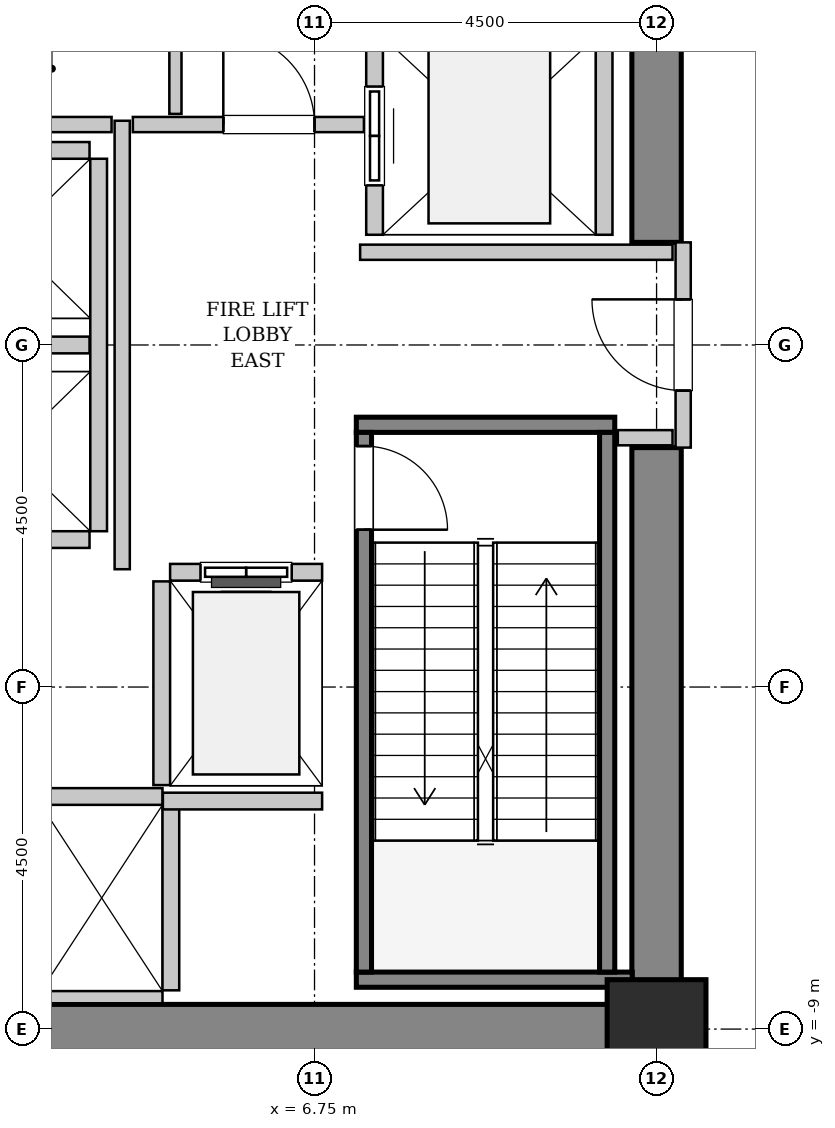
"""IFC4 building model, lengths in metres.
Left out: names, types, materials, properties, quantities, classifications, styles, units other than length and angle.
Written with IfcOpenShell. Run it as: python <this file> out.ifc"""

import sys

from ifc_helpers import new_model, si_unit, direction, frame, frame_2d, origin, origin_2d, place, context, subcontext, project, spatial, rectangle, hollow_rectangle, extrude, source, transform, mapped, element, fill, save


model = new_model("IFC4")
c1 = context("Model", 3, precision=1e-05, world=origin(), true_north=direction((0.0, 1.0)))
c2 = subcontext(c1, "Body", "Model", "MODEL_VIEW")
j1 = project(units=[si_unit("LENGTHUNIT", "METRE"), si_unit("PLANEANGLEUNIT", "RADIAN")], contexts=[c1])
p1 = place(None, origin())
s1 = spatial("IfcSite", under=j1, at=p1, CompositionType="ELEMENT")
p2 = place(p1, origin())
s2 = spatial("IfcBuilding", under=s1, at=p2, CompositionType="ELEMENT")
p3 = place(p2, frame((0.0, 0.0, 16.8)))
s3 = spatial("IfcBuildingStorey", under=s2, at=p3, CompositionType="ELEMENT", Elevation=16.8)
m1 = source(origin(), c2, "Body", "SweptSolid", [
    extrude(rectangle(XDim=10.025, YDim=0.65, at=frame_2d((5.012, 0.0))), origin(), (0.0, 0.0, 1.0), 5.4),
])
p4 = place(p3, frame((1.55, -9.0, 0.0), z_axis=(0.0, 0.0, 1.0), x_axis=(1.0, 0.0, 0.0)))
e1 = element("IfcWall", 1, at=p4, inside=s3, PredefinedType="SHEAR", context=c2, shape_type="MappedRepresentation", body=[
    mapped(m1, transform((0.0, 0.0, 0.0), x_axis=(1.0, 0.0, 0.0), y_axis=(0.0, 1.0, 0.0), z_axis=(0.0, 0.0, 1.0), scale=1.0)),
])
m2 = source(origin(), c2, "Body", "SweptSolid", [
    extrude(rectangle(XDim=7.325, YDim=0.65, at=frame_2d((3.663, 0.0))), origin(), (0.0, 0.0, 1.0), 5.4),
])
for number, where, z_axis, x_axis in (
    (2, (11.25, -8.675, 0.0), (0.0, 0.0, 1.0), (0.0, 1.0, 0.0)),
    (3, (11.25, 1.35, 0.0), (0.0, 0.0, 1.0), (0.0, 1.0, 0.0)),
):
    element("IfcWall", number, at=place(p3, frame(where, z_axis=z_axis, x_axis=x_axis)), inside=s3, PredefinedType="SHEAR", context=c2, shape_type="MappedRepresentation", body=[
        mapped(m2, transform((0.0, 0.0, 0.0), x_axis=(1.0, 0.0, 0.0), y_axis=(0.0, 1.0, 0.0), z_axis=(0.0, 0.0, 1.0), scale=1.0)),
    ])
m3 = source(origin(), c2, "Body", "SweptSolid", [
    extrude(hollow_rectangle(XDim=1.3, YDim=1.3, WallThickness=0.065, InnerFilletRadius=0.065, OuterFilletRadius=0.13, at=origin_2d()), origin(), (0.0, 0.0, 1.0), 5.4),
])
p5 = place(p3, frame((11.25, -9.0, 0.0), z_axis=(0.0, 0.0, 1.0), x_axis=(1.0, 0.0, 0.0)))
e4 = element("IfcColumn", 4, at=p5, inside=s3, PredefinedType="COLUMN", context=c2, shape_type="MappedRepresentation", body=[
    mapped(m3, transform((0.0, 0.0, 0.0), x_axis=(1.0, 0.0, 0.0), y_axis=(0.0, 1.0, 0.0), z_axis=(0.0, 0.0, 1.0), scale=1.0)),
])
m4 = source(origin(), c2, "Body", "SweptSolid", [
    extrude(rectangle(XDim=3.4, YDim=0.2, at=frame_2d((1.7, 0.0))), origin(), (0.0, 0.0, 1.0), 5.4),
])
p6 = place(p3, frame((7.3, -1.05, 0.0), z_axis=(0.0, 0.0, 1.0), x_axis=(1.0, 0.0, 0.0)))
e5 = element("IfcWall", 5, at=p6, inside=s3, PredefinedType="SOLIDWALL", context=c2, shape_type="MappedRepresentation", body=[
    mapped(m4, transform((0.0, 0.0, 0.0), x_axis=(1.0, 0.0, 0.0), y_axis=(0.0, 1.0, 0.0), z_axis=(0.0, 0.0, 1.0), scale=1.0)),
])
m5 = source(origin(), c2, "Body", "SweptSolid", [
    extrude(rectangle(XDim=3.63, YDim=0.2, at=frame_2d((1.815, 0.0))), origin(), (0.0, 0.0, 1.0), 5.4),
])
p7 = place(p3, frame((7.3, -8.35, 0.0), z_axis=(0.0, 0.0, 1.0), x_axis=(1.0, 0.0, 0.0)))
e6 = element("IfcWall", 6, at=p7, inside=s3, PredefinedType="SOLIDWALL", context=c2, shape_type="MappedRepresentation", body=[
    mapped(m5, transform((0.0, 0.0, 0.0), x_axis=(1.0, 0.0, 0.0), y_axis=(0.0, 1.0, 0.0), z_axis=(0.0, 0.0, 1.0), scale=1.0)),
])
m6 = source(origin(), c2, "Body", "SweptSolid", [
    extrude(rectangle(XDim=7.1, YDim=0.2, at=frame_2d((3.55, 0.0))), origin(), (0.0, 0.0, 1.0), 5.4),
])
p8 = place(p3, frame((7.4, -1.15, 0.0), z_axis=(0.0, 0.0, 1.0), x_axis=(0.0, -1.0, 0.0)))
e7 = element("IfcWall", 7, at=p8, inside=s3, PredefinedType="SOLIDWALL", context=c2, shape_type="MappedRepresentation", body=[
    mapped(m6, transform((0.0, 0.0, 0.0), x_axis=(1.0, 0.0, 0.0), y_axis=(0.0, 1.0, 0.0), z_axis=(0.0, 0.0, 1.0), scale=1.0)),
])
p9 = place(p8, frame((0.18, 0.0, 0.0)))
e8 = element("IfcOpeningElement", 8, at=p9, cuts=e7, PredefinedType="OPENING", context=c2, shape_type="SweptSolid", body=[
    extrude(rectangle(XDim=1.1, YDim=2.15, at=frame_2d((0.55, 1.075))), frame((0.0, 0.11, 0.0), z_axis=(0.0, -1.0, 0.0), x_axis=(1.0, 0.0, 0.0)), (0.0, 0.0, 1.0), 0.22),
])
p10 = place(p3, frame((10.6, -1.15, 0.0), z_axis=(0.0, 0.0, 1.0), x_axis=(0.0, -1.0, 0.0)))
e9 = element("IfcWall", 9, at=p10, inside=s3, PredefinedType="SOLIDWALL", context=c2, shape_type="MappedRepresentation", body=[
    mapped(m6, transform((0.0, 0.0, 0.0), x_axis=(1.0, 0.0, 0.0), y_axis=(0.0, 1.0, 0.0), z_axis=(0.0, 0.0, 1.0), scale=1.0)),
])
m7 = source(origin(), c2, "Body", "SweptSolid", [
    extrude(rectangle(XDim=2.0, YDim=0.22, at=frame_2d((1.0, 0.0))), origin(), (0.0, 0.0, 1.0), 5.085),
])
p11 = place(p3, frame((6.85, -2.99, 0.0), z_axis=(0.0, 0.0, 1.0), x_axis=(-1.0, 0.0, 0.0)))
e10 = element("IfcWall", 10, at=p11, inside=s3, PredefinedType="SOLIDWALL", context=c2, shape_type="MappedRepresentation", body=[
    mapped(m7, transform((0.0, 0.0, 0.0), x_axis=(1.0, 0.0, 0.0), y_axis=(0.0, 1.0, 0.0), z_axis=(0.0, 0.0, 1.0), scale=1.0)),
])
p12 = place(p11, frame((0.4, 0.0, 0.0)))
e11 = element("IfcOpeningElement", 11, at=p12, cuts=e10, PredefinedType="OPENING", context=c2, shape_type="SweptSolid", body=[
    extrude(rectangle(XDim=1.2, YDim=2.2, at=frame_2d((0.6, 1.1))), frame((0.0, 0.12, 0.0), z_axis=(0.0, -1.0, 0.0), x_axis=(1.0, 0.0, 0.0)), (0.0, 0.0, 1.0), 0.24),
])
m8 = source(origin(), c2, "Body", "SweptSolid", [
    extrude(rectangle(XDim=2.68, YDim=0.22, at=frame_2d((1.34, 0.0))), origin(), (0.0, 0.0, 1.0), 5.085),
])
p13 = place(p3, frame((4.74, -3.11, 0.0), z_axis=(0.0, 0.0, 1.0), x_axis=(0.0, -1.0, 0.0)))
e12 = element("IfcWall", 12, at=p13, inside=s3, PredefinedType="SOLIDWALL", context=c2, shape_type="MappedRepresentation", body=[
    mapped(m8, transform((0.0, 0.0, 0.0), x_axis=(1.0, 0.0, 0.0), y_axis=(0.0, 1.0, 0.0), z_axis=(0.0, 0.0, 1.0), scale=1.0)),
])
m9 = source(origin(), c2, "Body", "SweptSolid", [
    extrude(rectangle(XDim=5.45, YDim=0.22, at=frame_2d((2.725, 0.0))), origin(), (0.0, 0.0, 1.0), 5.085),
])
p14 = place(p3, frame((7.54, 6.9, 0.0), z_axis=(0.0, 0.0, 1.0), x_axis=(0.0, -1.0, 0.0)))
e13 = element("IfcWall", 13, at=p14, inside=s3, PredefinedType="SOLIDWALL", context=c2, shape_type="MappedRepresentation", body=[
    mapped(m9, transform((0.0, 0.0, 0.0), x_axis=(1.0, 0.0, 0.0), y_axis=(0.0, 1.0, 0.0), z_axis=(0.0, 0.0, 1.0), scale=1.0)),
])
p15 = place(p14, frame((3.5, 0.0, 0.0)))
e14 = element("IfcOpeningElement", 14, at=p15, cuts=e13, PredefinedType="OPENING", context=c2, shape_type="SweptSolid", body=[
    extrude(rectangle(XDim=1.3, YDim=2.3, at=frame_2d((0.65, 1.15))), frame((0.0, 0.12, 0.0), z_axis=(0.0, -1.0, 0.0), x_axis=(1.0, 0.0, 0.0)), (0.0, 0.0, 1.0), 0.24),
])
p16 = place(p14, frame((0.65, 0.0, 0.0)))
e15 = element("IfcOpeningElement", 15, at=p16, cuts=e13, PredefinedType="OPENING", context=c2, shape_type="SweptSolid", body=[
    extrude(rectangle(XDim=1.3, YDim=2.3, at=frame_2d((0.65, 1.15))), frame((0.0, 0.12, 0.0), z_axis=(0.0, -1.0, 0.0), x_axis=(1.0, 0.0, 0.0)), (0.0, 0.0, 1.0), 0.24),
])
p17 = place(p3, frame((10.56, 1.45, 0.0), z_axis=(0.0, 0.0, 1.0), x_axis=(0.0, 1.0, 0.0)))
e16 = element("IfcWall", 16, at=p17, inside=s3, PredefinedType="SOLIDWALL", context=c2, shape_type="MappedRepresentation", body=[
    mapped(m9, transform((0.0, 0.0, 0.0), x_axis=(1.0, 0.0, 0.0), y_axis=(0.0, 1.0, 0.0), z_axis=(0.0, 0.0, 1.0), scale=1.0)),
])
m10 = source(origin(), c2, "Body", "SweptSolid", [
    extrude(rectangle(XDim=3.2, YDim=0.22, at=frame_2d((1.6, 0.0))), origin(), (0.0, 0.0, 1.0), 5.085),
])
p18 = place(p3, frame((4.75, -5.94, 0.0), z_axis=(0.0, 0.0, 1.0), x_axis=(-1.0, 0.0, 0.0)))
e17 = element("IfcWall", 17, at=p18, inside=s3, PredefinedType="SOLIDWALL", context=c2, shape_type="MappedRepresentation", body=[
    mapped(m10, transform((0.0, 0.0, 0.0), x_axis=(1.0, 0.0, 0.0), y_axis=(0.0, 1.0, 0.0), z_axis=(0.0, 0.0, 1.0), scale=1.0)),
])
m11 = source(origin(), c2, "Body", "SweptSolid", [
    extrude(rectangle(XDim=3.2, YDim=0.16, at=frame_2d((1.6, 0.0))), origin(), (0.0, 0.0, 1.0), 3.975),
])
p19 = place(p3, frame((1.55, -8.58, 0.0), z_axis=(0.0, 0.0, 1.0), x_axis=(1.0, 0.0, 0.0)))
e18 = element("IfcWall", 18, at=p19, inside=s3, PredefinedType="PARTITIONING", context=c2, shape_type="MappedRepresentation", body=[
    mapped(m11, transform((0.0, 0.0, 0.0), x_axis=(1.0, 0.0, 0.0), y_axis=(0.0, 1.0, 0.0), z_axis=(0.0, 0.0, 1.0), scale=1.0)),
])
m12 = source(origin(), c2, "Body", "SweptSolid", [
    extrude(rectangle(XDim=2.43, YDim=0.22, at=frame_2d((1.215, 0.0))), origin(), (0.0, 0.0, 1.0), 5.085),
])
p20 = place(p3, frame((4.86, -8.49, 0.0), z_axis=(0.0, 0.0, 1.0), x_axis=(0.0, 1.0, 0.0)))
e19 = element("IfcWall", 19, at=p20, inside=s3, PredefinedType="SOLIDWALL", context=c2, shape_type="MappedRepresentation", body=[
    mapped(m12, transform((0.0, 0.0, 0.0), x_axis=(1.0, 0.0, 0.0), y_axis=(0.0, 1.0, 0.0), z_axis=(0.0, 0.0, 1.0), scale=1.0)),
])
m13 = source(origin(), c2, "Body", "SweptSolid", [
    extrude(rectangle(XDim=4.9, YDim=0.22, at=frame_2d((2.45, 0.0))), origin(), (0.0, 0.0, 1.0), 5.085),
])
p21 = place(p3, frame((3.91, -2.45, 0.0), z_axis=(0.0, 0.0, 1.0), x_axis=(0.0, 1.0, 0.0)))
e20 = element("IfcWall", 20, at=p21, inside=s3, PredefinedType="SOLIDWALL", context=c2, shape_type="MappedRepresentation", body=[
    mapped(m13, transform((0.0, 0.0, 0.0), x_axis=(1.0, 0.0, 0.0), y_axis=(0.0, 1.0, 0.0), z_axis=(0.0, 0.0, 1.0), scale=1.0)),
])
m14 = source(origin(), c2, "Body", "SweptSolid", [
    extrude(rectangle(XDim=2.13, YDim=0.22, at=frame_2d((1.065, 0.0))), origin(), (0.0, 0.0, 1.0), 5.085),
])
for number, where, z_axis, x_axis in (
    (21, (1.66, -2.56, 0.0), (0.0, 0.0, 1.0), (1.0, 0.0, 0.0)),
    (22, (1.66, 0.0, 0.0), (0.0, 0.0, 1.0), (1.0, 0.0, 0.0)),
    (23, (3.79, 2.56, 0.0), (0.0, 0.0, 1.0), (-1.0, 0.0, 0.0)),
):
    element("IfcWall", number, at=place(p3, frame(where, z_axis=z_axis, x_axis=x_axis)), inside=s3, PredefinedType="SOLIDWALL", context=c2, shape_type="MappedRepresentation", body=[
        mapped(m14, transform((0.0, 0.0, 0.0), x_axis=(1.0, 0.0, 0.0), y_axis=(0.0, 1.0, 0.0), z_axis=(0.0, 0.0, 1.0), scale=1.0)),
    ])
m15 = source(origin(), c2, "Body", "SweptSolid", [
    extrude(rectangle(XDim=2.095, YDim=0.22, at=frame_2d((1.048, 0.0))), origin(), (0.0, 0.0, 1.0), 5.085),
])
p22 = place(p3, frame((4.755, -6.0, 0.0), z_axis=(0.0, 0.0, 1.0), x_axis=(1.0, 0.0, 0.0)))
e24 = element("IfcWall", 24, at=p22, inside=s3, PredefinedType="SOLIDWALL", context=c2, shape_type="MappedRepresentation", body=[
    mapped(m15, transform((0.0, 0.0, 0.0), x_axis=(1.0, 0.0, 0.0), y_axis=(0.0, 1.0, 0.0), z_axis=(0.0, 0.0, 1.0), scale=1.0)),
])
m16 = source(origin(), c2, "Body", "SweptSolid", [
    extrude(rectangle(XDim=2.7, YDim=0.2, at=frame_2d((1.35, 0.0))), origin(), (0.0, 0.0, 1.0), 3.975),
])
p23 = place(p3, frame((11.6, -1.35, 0.0), z_axis=(0.0, 0.0, 1.0), x_axis=(0.0, 1.0, 0.0)))
e25 = element("IfcWall", 25, at=p23, inside=s3, PredefinedType="PARTITIONING", context=c2, shape_type="MappedRepresentation", body=[
    mapped(m16, transform((0.0, 0.0, 0.0), x_axis=(1.0, 0.0, 0.0), y_axis=(0.0, 1.0, 0.0), z_axis=(0.0, 0.0, 1.0), scale=1.0)),
])
p24 = place(p23, frame((0.75, 0.0, 0.0)))
e26 = element("IfcOpeningElement", 26, at=p24, cuts=e25, PredefinedType="OPENING", context=c2, shape_type="SweptSolid", body=[
    extrude(rectangle(XDim=1.2, YDim=2.15, at=frame_2d((0.6, 1.075))), frame((0.0, 0.11, 0.0), z_axis=(0.0, -1.0, 0.0), x_axis=(1.0, 0.0, 0.0)), (0.0, 0.0, 1.0), 0.22),
])
m17 = source(origin(), c2, "Body", "SweptSolid", [
    extrude(rectangle(XDim=5.9, YDim=0.2, at=frame_2d((2.95, 0.0))), origin(), (0.0, 0.0, 1.0), 5.085),
])
p25 = place(p3, frame((4.22, -2.95, 0.0), z_axis=(0.0, 0.0, 1.0), x_axis=(0.0, 1.0, 0.0)))
e27 = element("IfcWall", 27, at=p25, inside=s3, PredefinedType="PARTITIONING", context=c2, shape_type="MappedRepresentation", body=[
    mapped(m17, transform((0.0, 0.0, 0.0), x_axis=(1.0, 0.0, 0.0), y_axis=(0.0, 1.0, 0.0), z_axis=(0.0, 0.0, 1.0), scale=1.0)),
])
m18 = source(origin(), c2, "Body", "SweptSolid", [
    extrude(rectangle(XDim=2.52, YDim=0.2, at=frame_2d((1.26, 0.0))), origin(), (0.0, 0.0, 1.0), 5.085),
])
p26 = place(p3, frame((1.56, 2.9, 0.0), z_axis=(0.0, 0.0, 1.0), x_axis=(1.0, 0.0, 0.0)))
e28 = element("IfcWall", 28, at=p26, inside=s3, PredefinedType="PARTITIONING", context=c2, shape_type="MappedRepresentation", body=[
    mapped(m18, transform((0.0, 0.0, 0.0), x_axis=(1.0, 0.0, 0.0), y_axis=(0.0, 1.0, 0.0), z_axis=(0.0, 0.0, 1.0), scale=1.0)),
])
m19 = source(origin(), c2, "Body", "SweptSolid", [
    extrude(rectangle(XDim=3.04, YDim=0.2, at=frame_2d((1.52, 0.0))), origin(), (0.0, 0.0, 1.0), 5.085),
])
p27 = place(p3, frame((4.36, 2.9, 0.0), z_axis=(0.0, 0.0, 1.0), x_axis=(1.0, 0.0, 0.0)))
e29 = element("IfcWall", 29, at=p27, inside=s3, PredefinedType="PARTITIONING", context=c2, shape_type="MappedRepresentation", body=[
    mapped(m19, transform((0.0, 0.0, 0.0), x_axis=(1.0, 0.0, 0.0), y_axis=(0.0, 1.0, 0.0), z_axis=(0.0, 0.0, 1.0), scale=1.0)),
])
p28 = place(p27, frame((1.19, 0.0, 0.0)))
e30 = element("IfcOpeningElement", 30, at=p28, cuts=e29, PredefinedType="OPENING", context=c2, shape_type="SweptSolid", body=[
    extrude(rectangle(XDim=1.2, YDim=2.15, at=frame_2d((0.6, 1.075))), frame((0.0, 0.11, 0.0), z_axis=(0.0, -1.0, 0.0), x_axis=(1.0, 0.0, 0.0)), (0.0, 0.0, 1.0), 0.22),
])
m20 = source(origin(), c2, "Body", "SweptSolid", [
    extrude(rectangle(XDim=4.11, YDim=0.2, at=frame_2d((2.055, 0.0))), origin(), (0.0, 0.0, 1.0), 5.085),
])
p29 = place(p3, frame((7.35, 1.22, 0.0), z_axis=(0.0, 0.0, 1.0), x_axis=(1.0, 0.0, 0.0)))
e31 = element("IfcWall", 31, at=p29, inside=s3, PredefinedType="PARTITIONING", context=c2, shape_type="MappedRepresentation", body=[
    mapped(m20, transform((0.0, 0.0, 0.0), x_axis=(1.0, 0.0, 0.0), y_axis=(0.0, 1.0, 0.0), z_axis=(0.0, 0.0, 1.0), scale=1.0)),
])
m21 = source(origin(), c2, "Body", "SweptSolid", [
    extrude(rectangle(XDim=0.72, YDim=0.2, at=frame_2d((0.36, 0.0))), origin(), (0.0, 0.0, 1.0), 5.085),
])
p30 = place(p3, frame((10.74, -1.22, 0.0), z_axis=(0.0, 0.0, 1.0), x_axis=(1.0, 0.0, 0.0)))
e32 = element("IfcWall", 32, at=p30, inside=s3, PredefinedType="PARTITIONING", context=c2, shape_type="MappedRepresentation", body=[
    mapped(m21, transform((0.0, 0.0, 0.0), x_axis=(1.0, 0.0, 0.0), y_axis=(0.0, 1.0, 0.0), z_axis=(0.0, 0.0, 1.0), scale=1.0)),
])
m22 = source(origin(), c2, "Body", "SweptSolid", [
    extrude(rectangle(XDim=3.015, YDim=0.16, at=frame_2d((1.507, 0.0))), origin(), (0.0, 0.0, 1.0), 5.085),
])
p31 = place(p3, frame((4.92, 3.04, 0.0), z_axis=(0.0, 0.0, 1.0), x_axis=(0.0, 1.0, 0.0)))
e33 = element("IfcWall", 33, at=p31, inside=s3, PredefinedType="PARTITIONING", context=c2, shape_type="MappedRepresentation", body=[
    mapped(m22, transform((0.0, 0.0, 0.0), x_axis=(1.0, 0.0, 0.0), y_axis=(0.0, 1.0, 0.0), z_axis=(0.0, 0.0, 1.0), scale=1.0)),
])
m23 = source(origin(), c2, "Body", "SweptSolid", [
    extrude(rectangle(XDim=1.1, YDim=2.15, at=frame_2d((0.55, 1.075))), frame((0.0, 0.025, 0.0), z_axis=(0.0, -1.0, 0.0), x_axis=(1.0, 0.0, 0.0)), (0.0, 0.0, 1.0), 0.05),
])
p32 = place(p9, origin())
e34 = element("IfcDoor", 34, at=p32, inside=s3, OperationType="SINGLE_SWING_RIGHT", PredefinedType="DOOR", context=c2, shape_type="MappedRepresentation", body=[
    mapped(m23, transform((0.0, 0.0, 0.0), x_axis=(1.0, 0.0, 0.0), y_axis=(0.0, 1.0, 0.0), z_axis=(0.0, 0.0, 1.0), scale=1.0)),
])
fill(e8, e34)
m24 = source(origin(), c2, "Body", "SweptSolid", [
    extrude(rectangle(XDim=1.2, YDim=2.2, at=frame_2d((0.6, 1.1))), frame((0.0, 0.025, 0.0), z_axis=(0.0, -1.0, 0.0), x_axis=(1.0, 0.0, 0.0)), (0.0, 0.0, 1.0), 0.05),
])
p33 = place(p12, origin())
e35 = element("IfcDoor", 35, at=p33, inside=s3, OperationType="SLIDING_TO_LEFT", PredefinedType="DOOR", context=c2, shape_type="MappedRepresentation", body=[
    mapped(m24, transform((0.0, 0.0, 0.0), x_axis=(1.0, 0.0, 0.0), y_axis=(0.0, 1.0, 0.0), z_axis=(0.0, 0.0, 1.0), scale=1.0)),
])
fill(e11, e35)
m25 = source(origin(), c2, "Body", "SweptSolid", [
    extrude(rectangle(XDim=1.3, YDim=2.3, at=frame_2d((0.65, 1.15))), frame((0.0, 0.025, 0.0), z_axis=(0.0, -1.0, 0.0), x_axis=(1.0, 0.0, 0.0)), (0.0, 0.0, 1.0), 0.05),
])
p34 = place(p15, origin())
e36 = element("IfcDoor", 36, at=p34, inside=s3, OperationType="SLIDING_TO_RIGHT", PredefinedType="DOOR", context=c2, shape_type="MappedRepresentation", body=[
    mapped(m25, transform((0.0, 0.0, 0.0), x_axis=(1.0, 0.0, 0.0), y_axis=(0.0, 1.0, 0.0), z_axis=(0.0, 0.0, 1.0), scale=1.0)),
])
fill(e14, e36)
m26 = source(origin(), c2, "Body", "SweptSolid", [
    extrude(rectangle(XDim=1.2, YDim=2.15, at=frame_2d((0.6, 1.075))), frame((0.0, 0.025, 0.0), z_axis=(0.0, -1.0, 0.0), x_axis=(1.0, 0.0, 0.0)), (0.0, 0.0, 1.0), 0.05),
])
p35 = place(p24, origin())
e37 = element("IfcDoor", 37, at=p35, inside=s3, OperationType="SINGLE_SWING_RIGHT", PredefinedType="DOOR", context=c2, shape_type="MappedRepresentation", body=[
    mapped(m26, transform((0.0, 0.0, 0.0), x_axis=(1.0, 0.0, 0.0), y_axis=(0.0, 1.0, 0.0), z_axis=(0.0, 0.0, 1.0), scale=1.0)),
])
fill(e26, e37)
p36 = place(p28, origin())
e38 = element("IfcDoor", 38, at=p36, inside=s3, OperationType="SINGLE_SWING_LEFT", PredefinedType="DOOR", context=c2, shape_type="MappedRepresentation", body=[
    mapped(m26, transform((0.0, 0.0, 0.0), x_axis=(1.0, 0.0, 0.0), y_axis=(0.0, 1.0, 0.0), z_axis=(0.0, 0.0, 1.0), scale=1.0)),
])
fill(e30, e38)
save(model, sys.argv[1])
